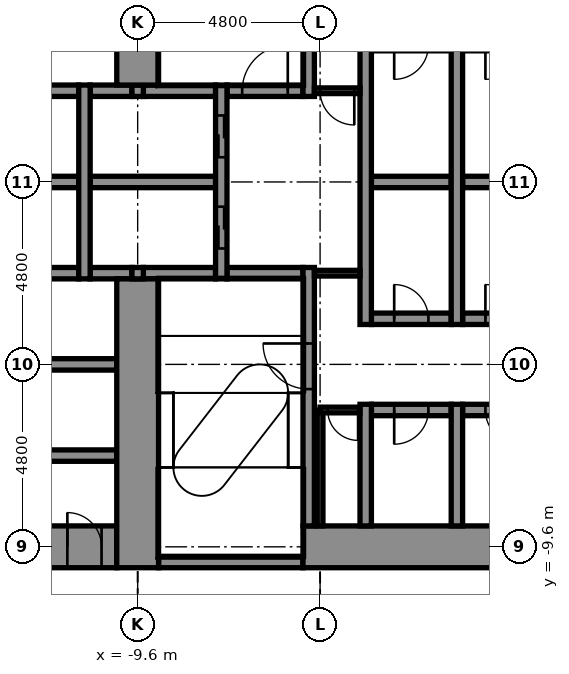
"""IFC4 building model, lengths in metres.
Left out: names, types, materials, properties, quantities, classifications, styles, units other than length and angle.
Written with IfcOpenShell. Run it as: python <this file> out.ifc"""

import sys

from ifc_helpers import new_model, si_unit, direction, frame, frame_2d, origin, place, context, subcontext, project, spatial, rectangle, extrude, element, fill, save


model = new_model("IFC4")
c1 = context("Model", 3, precision=1e-05, world=origin(), true_north=direction((0.0, 1.0)))
c2 = subcontext(c1, "Body", "Model", "MODEL_VIEW")
j1 = project(units=[si_unit("LENGTHUNIT", "METRE"), si_unit("PLANEANGLEUNIT", "RADIAN")], contexts=[c1])
p1 = place(None, origin())
s1 = spatial("IfcSite", under=j1, at=p1, CompositionType="ELEMENT")
p2 = place(p1, origin())
s2 = spatial("IfcBuilding", under=s1, at=p2, CompositionType="ELEMENT")
p3 = place(p2, frame((0.0, 0.0, 60.9)))
s3 = spatial("IfcBuildingStorey", under=s2, at=p3, CompositionType="ELEMENT", Elevation=60.9)
p4 = place(p3, frame((-9.05, -10.0, -0.25), z_axis=(0.0, 0.0, 1.0), x_axis=(1.0, 0.0, 0.0)))
e1 = element("IfcWall", 1, at=p4, inside=s3, PredefinedType="STANDARD", context=c2, shape_type="SweptSolid", body=[
    extrude(rectangle(XDim=3.8, YDim=0.3, at=frame_2d((1.9, 0.0))), origin(), (0.0, 0.0, 1.0), 5.45),
])
p5 = place(p3, frame((-13.85, -9.6, -0.25), z_axis=(0.0, 0.0, 1.0), x_axis=(1.0, 0.0, 0.0)))
e2 = element("IfcWall", 2, at=p5, inside=s3, PredefinedType="SHEAR", context=c2, shape_type="SweptSolid", body=[
    extrude(rectangle(XDim=3.7, YDim=1.1, at=frame_2d((1.85, 0.0))), origin(), (0.0, 0.0, 1.0), 5.45),
])
p6 = place(p5, frame((0.05, 0.0, 0.25)))
e3 = element("IfcOpeningElement", 3, at=p6, cuts=e2, PredefinedType="OPENING", context=c2, shape_type="SweptSolid", body=[
    extrude(rectangle(XDim=0.9, YDim=2.1, at=frame_2d((0.45, 1.05))), frame((0.0, 0.56, 0.0), z_axis=(0.0, -1.0, 0.0), x_axis=(1.0, 0.0, 0.0)), (0.0, 0.0, 1.0), 1.12),
])
p7 = place(p5, frame((2.4, 0.0, 0.25)))
e4 = element("IfcOpeningElement", 4, at=p7, cuts=e2, PredefinedType="OPENING", context=c2, shape_type="SweptSolid", body=[
    extrude(rectangle(XDim=0.9, YDim=2.1, at=frame_2d((0.45, 1.05))), frame((0.0, 0.56, 0.0), z_axis=(0.0, -1.0, 0.0), x_axis=(1.0, 0.0, 0.0)), (0.0, 0.0, 1.0), 1.12),
])
p8 = place(p3, frame((-5.25, -9.6, -0.25), z_axis=(0.0, 0.0, 1.0), x_axis=(1.0, 0.0, 0.0)))
e5 = element("IfcWall", 5, at=p8, inside=s3, PredefinedType="SHEAR", context=c2, shape_type="SweptSolid", body=[
    extrude(rectangle(XDim=10.2, YDim=1.1, at=frame_2d((5.1, 0.0))), origin(), (0.0, 0.0, 1.0), 5.45),
])
p9 = place(p8, frame((9.0, 0.0, 0.25)))
e6 = element("IfcOpeningElement", 6, at=p9, cuts=e5, PredefinedType="OPENING", context=c2, shape_type="SweptSolid", body=[
    extrude(rectangle(XDim=0.9, YDim=2.1, at=frame_2d((0.45, 1.05))), frame((0.0, 0.56, 0.0), z_axis=(0.0, -1.0, 0.0), x_axis=(1.0, 0.0, 0.0)), (0.0, 0.0, 1.0), 1.12),
])
p10 = place(p3, frame((-13.85, -7.2, -0.25), z_axis=(0.0, 0.0, 1.0), x_axis=(1.0, 0.0, 0.0)))
e7 = element("IfcWall", 7, at=p10, inside=s3, PredefinedType="STANDARD", context=c2, shape_type="SweptSolid", body=[
    extrude(rectangle(XDim=3.7, YDim=0.3, at=frame_2d((1.85, 0.0))), origin(), (0.0, 0.0, 1.0), 5.45),
])
p11 = place(p3, frame((-3.45, -6.0, -0.25), z_axis=(0.0, 0.0, 1.0), x_axis=(1.0, 0.0, 0.0)))
e8 = element("IfcWall", 8, at=p11, inside=s3, PredefinedType="STANDARD", context=c2, shape_type="SweptSolid", body=[
    extrude(rectangle(XDim=2.1, YDim=0.3, at=frame_2d((1.05, 0.0))), origin(), (0.0, 0.0, 1.0), 5.45),
])
p12 = place(p11, frame((0.6, 0.0, 0.25)))
e9 = element("IfcOpeningElement", 9, at=p12, cuts=e8, PredefinedType="OPENING", context=c2, shape_type="SweptSolid", body=[
    extrude(rectangle(XDim=0.9, YDim=2.1, at=frame_2d((0.45, 1.05))), frame((0.0, 0.16, 0.0), z_axis=(0.0, -1.0, 0.0), x_axis=(1.0, 0.0, 0.0)), (0.0, 0.0, 1.0), 0.32),
])
p13 = place(p3, frame((-1.05, -6.0, -0.25), z_axis=(0.0, 0.0, 1.0), x_axis=(1.0, 0.0, 0.0)))
e10 = element("IfcWall", 10, at=p13, inside=s3, PredefinedType="STANDARD", context=c2, shape_type="SweptSolid", body=[
    extrude(rectangle(XDim=2.1, YDim=0.3, at=frame_2d((1.05, 0.0))), origin(), (0.0, 0.0, 1.0), 5.45),
])
p14 = place(p13, frame((0.6, 0.0, 0.25)))
e11 = element("IfcOpeningElement", 11, at=p14, cuts=e10, PredefinedType="OPENING", context=c2, shape_type="SweptSolid", body=[
    extrude(rectangle(XDim=0.9, YDim=2.1, at=frame_2d((0.45, 1.05))), frame((0.0, 0.16, 0.0), z_axis=(0.0, -1.0, 0.0), x_axis=(1.0, 0.0, 0.0)), (0.0, 0.0, 1.0), 0.32),
])
p15 = place(p3, frame((-13.85, -4.8, -0.25), z_axis=(0.0, 0.0, 1.0), x_axis=(1.0, 0.0, 0.0)))
e12 = element("IfcWall", 12, at=p15, inside=s3, PredefinedType="STANDARD", context=c2, shape_type="SweptSolid", body=[
    extrude(rectangle(XDim=3.7, YDim=0.3, at=frame_2d((1.85, 0.0))), origin(), (0.0, 0.0, 1.0), 5.45),
])
p16 = place(p3, frame((-3.45, -3.6, -0.25), z_axis=(0.0, 0.0, 1.0), x_axis=(1.0, 0.0, 0.0)))
e13 = element("IfcWall", 13, at=p16, inside=s3, PredefinedType="STANDARD", context=c2, shape_type="SweptSolid", body=[
    extrude(rectangle(XDim=2.1, YDim=0.3, at=frame_2d((1.05, 0.0))), origin(), (0.0, 0.0, 1.0), 5.45),
])
p17 = place(p16, frame((0.6, 0.0, 0.25)))
e14 = element("IfcOpeningElement", 14, at=p17, cuts=e13, PredefinedType="OPENING", context=c2, shape_type="SweptSolid", body=[
    extrude(rectangle(XDim=0.9, YDim=2.1, at=frame_2d((0.45, 1.05))), frame((0.0, 0.16, 0.0), z_axis=(0.0, -1.0, 0.0), x_axis=(1.0, 0.0, 0.0)), (0.0, 0.0, 1.0), 0.32),
])
p18 = place(p3, frame((-1.05, -3.6, -0.25), z_axis=(0.0, 0.0, 1.0), x_axis=(1.0, 0.0, 0.0)))
e15 = element("IfcWall", 15, at=p18, inside=s3, PredefinedType="STANDARD", context=c2, shape_type="SweptSolid", body=[
    extrude(rectangle(XDim=2.1, YDim=0.3, at=frame_2d((1.05, 0.0))), origin(), (0.0, 0.0, 1.0), 5.45),
])
p19 = place(p18, frame((0.6, 0.0, 0.25)))
e16 = element("IfcOpeningElement", 16, at=p19, cuts=e15, PredefinedType="OPENING", context=c2, shape_type="SweptSolid", body=[
    extrude(rectangle(XDim=0.9, YDim=2.1, at=frame_2d((0.45, 1.05))), frame((0.0, 0.16, 0.0), z_axis=(0.0, -1.0, 0.0), x_axis=(1.0, 0.0, 0.0)), (0.0, 0.0, 1.0), 0.32),
])
p20 = place(p3, frame((-13.85, -2.4, -0.25), z_axis=(0.0, 0.0, 1.0), x_axis=(1.0, 0.0, 0.0)))
e17 = element("IfcWall", 17, at=p20, inside=s3, PredefinedType="STANDARD", context=c2, shape_type="SweptSolid", body=[
    extrude(rectangle(XDim=2.7, YDim=0.3, at=frame_2d((1.35, 0.0))), origin(), (0.0, 0.0, 1.0), 5.45),
])
p21 = place(p3, frame((-10.85, -2.4, -0.25), z_axis=(0.0, 0.0, 1.0), x_axis=(1.0, 0.0, 0.0)))
e18 = element("IfcWall", 18, at=p21, inside=s3, PredefinedType="STANDARD", context=c2, shape_type="SweptSolid", body=[
    extrude(rectangle(XDim=1.1, YDim=0.3, at=frame_2d((0.55, 0.0))), origin(), (0.0, 0.0, 1.0), 5.45),
])
p22 = place(p3, frame((-9.45, -2.4, -0.25), z_axis=(0.0, 0.0, 1.0), x_axis=(1.0, 0.0, 0.0)))
e19 = element("IfcWall", 19, at=p22, inside=s3, PredefinedType="STANDARD", context=c2, shape_type="SweptSolid", body=[
    extrude(rectangle(XDim=1.9, YDim=0.3, at=frame_2d((0.95, 0.0))), origin(), (0.0, 0.0, 1.0), 5.45),
])
p23 = place(p3, frame((-7.25, -2.4, -0.25), z_axis=(0.0, 0.0, 1.0), x_axis=(1.0, 0.0, 0.0)))
e20 = element("IfcWall", 20, at=p23, inside=s3, PredefinedType="STANDARD", context=c2, shape_type="SweptSolid", body=[
    extrude(rectangle(XDim=2.0, YDim=0.3, at=frame_2d((1.0, 0.0))), origin(), (0.0, 0.0, 1.0), 5.45),
])
p24 = place(p3, frame((-13.85, 0.0, -0.25), z_axis=(0.0, 0.0, 1.0), x_axis=(1.0, 0.0, 0.0)))
e21 = element("IfcWall", 21, at=p24, inside=s3, PredefinedType="STANDARD", context=c2, shape_type="SweptSolid", body=[
    extrude(rectangle(XDim=2.7, YDim=0.3, at=frame_2d((1.35, 0.0))), origin(), (0.0, 0.0, 1.0), 5.45),
])
p25 = place(p3, frame((-10.85, 0.0, -0.25), z_axis=(0.0, 0.0, 1.0), x_axis=(1.0, 0.0, 0.0)))
e22 = element("IfcWall", 22, at=p25, inside=s3, PredefinedType="STANDARD", context=c2, shape_type="SweptSolid", body=[
    extrude(rectangle(XDim=3.3, YDim=0.3, at=frame_2d((1.65, 0.0))), origin(), (0.0, 0.0, 1.0), 5.45),
])
p26 = place(p3, frame((-3.45, 0.0, -0.25), z_axis=(0.0, 0.0, 1.0), x_axis=(1.0, 0.0, 0.0)))
e23 = element("IfcWall", 23, at=p26, inside=s3, PredefinedType="STANDARD", context=c2, shape_type="SweptSolid", body=[
    extrude(rectangle(XDim=2.1, YDim=0.3, at=frame_2d((1.05, 0.0))), origin(), (0.0, 0.0, 1.0), 5.45),
])
p27 = place(p3, frame((-1.05, 0.0, -0.25), z_axis=(0.0, 0.0, 1.0), x_axis=(1.0, 0.0, 0.0)))
e24 = element("IfcWall", 24, at=p27, inside=s3, PredefinedType="STANDARD", context=c2, shape_type="SweptSolid", body=[
    extrude(rectangle(XDim=2.1, YDim=0.3, at=frame_2d((1.05, 0.0))), origin(), (0.0, 0.0, 1.0), 5.45),
])
p28 = place(p3, frame((-13.85, 2.4, -0.25), z_axis=(0.0, 0.0, 1.0), x_axis=(1.0, 0.0, 0.0)))
e25 = element("IfcWall", 25, at=p28, inside=s3, PredefinedType="STANDARD", context=c2, shape_type="SweptSolid", body=[
    extrude(rectangle(XDim=2.7, YDim=0.3, at=frame_2d((1.35, 0.0))), origin(), (0.0, 0.0, 1.0), 5.45),
])
p29 = place(p3, frame((-10.85, 2.4, -0.25), z_axis=(0.0, 0.0, 1.0), x_axis=(1.0, 0.0, 0.0)))
e26 = element("IfcWall", 26, at=p29, inside=s3, PredefinedType="STANDARD", context=c2, shape_type="SweptSolid", body=[
    extrude(rectangle(XDim=1.1, YDim=0.3, at=frame_2d((0.55, 0.0))), origin(), (0.0, 0.0, 1.0), 5.45),
])
p30 = place(p3, frame((-9.45, 2.4, -0.25), z_axis=(0.0, 0.0, 1.0), x_axis=(1.0, 0.0, 0.0)))
e27 = element("IfcWall", 27, at=p30, inside=s3, PredefinedType="STANDARD", context=c2, shape_type="SweptSolid", body=[
    extrude(rectangle(XDim=1.9, YDim=0.3, at=frame_2d((0.95, 0.0))), origin(), (0.0, 0.0, 1.0), 5.45),
])
p31 = place(p3, frame((-7.25, 2.4, -0.25), z_axis=(0.0, 0.0, 1.0), x_axis=(1.0, 0.0, 0.0)))
e28 = element("IfcWall", 28, at=p31, inside=s3, PredefinedType="STANDARD", context=c2, shape_type="SweptSolid", body=[
    extrude(rectangle(XDim=2.0, YDim=0.3, at=frame_2d((1.0, 0.0))), origin(), (0.0, 0.0, 1.0), 5.45),
])
p32 = place(p31, frame((0.4, 0.0, 0.25)))
e29 = element("IfcOpeningElement", 29, at=p32, cuts=e28, PredefinedType="OPENING", context=c2, shape_type="SweptSolid", body=[
    extrude(rectangle(XDim=1.2, YDim=2.1, at=frame_2d((0.6, 1.05))), frame((0.0, 0.16, 0.0), z_axis=(0.0, -1.0, 0.0), x_axis=(1.0, 0.0, 0.0)), (0.0, 0.0, 1.0), 0.32),
])
p33 = place(p3, frame((-11.0, -2.55, -0.25), z_axis=(0.0, 0.0, 1.0), x_axis=(0.0, 1.0, 0.0)))
e30 = element("IfcWall", 30, at=p33, inside=s3, PredefinedType="STANDARD", context=c2, shape_type="SweptSolid", body=[
    extrude(rectangle(XDim=5.1, YDim=0.3, at=frame_2d((2.55, 0.0))), origin(), (0.0, 0.0, 1.0), 5.45),
])
p34 = place(p3, frame((-9.6, -10.15, -0.25), z_axis=(0.0, 0.0, 1.0), x_axis=(0.0, 1.0, 0.0)))
e31 = element("IfcWall", 31, at=p34, inside=s3, PredefinedType="SHEAR", context=c2, shape_type="SweptSolid", body=[
    extrude(rectangle(XDim=7.6, YDim=1.1, at=frame_2d((3.8, 0.0))), origin(), (0.0, 0.0, 1.0), 5.45),
])
for number, where, z_axis, x_axis in (
    (32, (-9.6, -2.55, -0.25), (0.0, 0.0, 1.0), (0.0, 1.0, 0.0)),
    (33, (-9.6, 2.25, -0.25), (0.0, 0.0, 1.0), (0.0, 1.0, 0.0)),
):
    element("IfcWall", number, at=place(p3, frame(where, z_axis=z_axis, x_axis=x_axis)), inside=s3, PredefinedType="STANDARD", context=c2, shape_type="SweptSolid", body=[
        extrude(rectangle(XDim=0.3, YDim=0.3, at=frame_2d((0.15, 0.0))), origin(), (0.0, 0.0, 1.0), 5.45),
    ])
p35 = place(p3, frame((-9.6, 2.55, -0.25), z_axis=(0.0, 0.0, 1.0), x_axis=(0.0, 1.0, 0.0)))
e34 = element("IfcWall", 34, at=p35, inside=s3, PredefinedType="SHEAR", context=c2, shape_type="SweptSolid", body=[
    extrude(rectangle(XDim=7.6, YDim=1.1, at=frame_2d((3.8, 0.0))), origin(), (0.0, 0.0, 1.0), 5.45),
])
p36 = place(p3, frame((-7.4, -2.55, -0.25), z_axis=(0.0, 0.0, 1.0), x_axis=(0.0, 1.0, 0.0)))
e35 = element("IfcWall", 35, at=p36, inside=s3, PredefinedType="STANDARD", context=c2, shape_type="SweptSolid", body=[
    extrude(rectangle(XDim=5.1, YDim=0.3, at=frame_2d((2.55, 0.0))), origin(), (0.0, 0.0, 1.0), 5.45),
])
p37 = place(p36, frame((0.8, 0.0, 0.25)))
e36 = element("IfcOpeningElement", 36, at=p37, cuts=e35, PredefinedType="OPENING", context=c2, shape_type="SweptSolid", body=[
    extrude(rectangle(XDim=1.1, YDim=2.1, at=frame_2d((0.55, 1.05))), frame((0.0, 0.16, 0.0), z_axis=(0.0, -1.0, 0.0), x_axis=(1.0, 0.0, 0.0)), (0.0, 0.0, 1.0), 0.32),
])
p38 = place(p36, frame((3.2, 0.0, 0.25)))
e37 = element("IfcOpeningElement", 37, at=p38, cuts=e35, PredefinedType="OPENING", context=c2, shape_type="SweptSolid", body=[
    extrude(rectangle(XDim=1.1, YDim=2.1, at=frame_2d((0.55, 1.05))), frame((0.0, 0.16, 0.0), z_axis=(0.0, -1.0, 0.0), x_axis=(1.0, 0.0, 0.0)), (0.0, 0.0, 1.0), 0.32),
])
p39 = place(p3, frame((-5.1, -9.05, -0.25), z_axis=(0.0, 0.0, 1.0), x_axis=(0.0, 1.0, 0.0)))
e38 = element("IfcWall", 38, at=p39, inside=s3, PredefinedType="STANDARD", context=c2, shape_type="SweptSolid", body=[
    extrude(rectangle(XDim=6.8, YDim=0.3, at=frame_2d((3.4, 0.0))), origin(), (0.0, 0.0, 1.0), 5.45),
])
p40 = place(p39, frame((3.6, 0.0, 0.25)))
e39 = element("IfcOpeningElement", 39, at=p40, cuts=e38, PredefinedType="OPENING", context=c2, shape_type="SweptSolid", body=[
    extrude(rectangle(XDim=1.2, YDim=2.1, at=frame_2d((0.6, 1.05))), frame((0.0, 0.16, 0.0), z_axis=(0.0, -1.0, 0.0), x_axis=(1.0, 0.0, 0.0)), (0.0, 0.0, 1.0), 0.32),
])
p41 = place(p3, frame((-5.1, 2.25, -0.25), z_axis=(0.0, 0.0, 1.0), x_axis=(0.0, 1.0, 0.0)))
e40 = element("IfcWall", 40, at=p41, inside=s3, PredefinedType="STANDARD", context=c2, shape_type="SweptSolid", body=[
    extrude(rectangle(XDim=6.8, YDim=0.3, at=frame_2d((3.4, 0.0))), origin(), (0.0, 0.0, 1.0), 5.45),
])
p42 = place(p41, frame((2.0, 0.0, 0.25)))
e41 = element("IfcOpeningElement", 41, at=p42, cuts=e40, PredefinedType="OPENING", context=c2, shape_type="SweptSolid", body=[
    extrude(rectangle(XDim=1.2, YDim=2.1, at=frame_2d((0.6, 1.05))), frame((0.0, 0.16, 0.0), z_axis=(0.0, -1.0, 0.0), x_axis=(1.0, 0.0, 0.0)), (0.0, 0.0, 1.0), 0.32),
])
p43 = place(p3, frame((-3.6, -9.05, -0.25), z_axis=(0.0, 0.0, 1.0), x_axis=(0.0, 1.0, 0.0)))
e42 = element("IfcWall", 42, at=p43, inside=s3, PredefinedType="STANDARD", context=c2, shape_type="SweptSolid", body=[
    extrude(rectangle(XDim=3.2, YDim=0.3, at=frame_2d((1.6, 0.0))), origin(), (0.0, 0.0, 1.0), 5.45),
])
p44 = place(p3, frame((-3.6, -3.75, -0.25), z_axis=(0.0, 0.0, 1.0), x_axis=(0.0, 1.0, 0.0)))
e43 = element("IfcWall", 43, at=p44, inside=s3, PredefinedType="STANDARD", context=c2, shape_type="SweptSolid", body=[
    extrude(rectangle(XDim=7.5, YDim=0.3, at=frame_2d((3.75, 0.0))), origin(), (0.0, 0.0, 1.0), 5.45),
])
p45 = place(p3, frame((-1.2, -9.05, -0.25), z_axis=(0.0, 0.0, 1.0), x_axis=(0.0, 1.0, 0.0)))
e44 = element("IfcWall", 44, at=p45, inside=s3, PredefinedType="STANDARD", context=c2, shape_type="SweptSolid", body=[
    extrude(rectangle(XDim=3.2, YDim=0.3, at=frame_2d((1.6, 0.0))), origin(), (0.0, 0.0, 1.0), 5.45),
])
p46 = place(p3, frame((-1.2, -3.75, -0.25), z_axis=(0.0, 0.0, 1.0), x_axis=(0.0, 1.0, 0.0)))
e45 = element("IfcWall", 45, at=p46, inside=s3, PredefinedType="STANDARD", context=c2, shape_type="SweptSolid", body=[
    extrude(rectangle(XDim=7.5, YDim=0.3, at=frame_2d((3.75, 0.0))), origin(), (0.0, 0.0, 1.0), 5.45),
])
p47 = place(p3, frame((-4.8, -9.05, 0.0), z_axis=(0.0, 0.0, 1.0), x_axis=(0.0, 1.0, 0.0)))
e46 = element("IfcWall", 46, at=p47, inside=s3, PredefinedType="PARTITIONING", context=c2, shape_type="SweptSolid", body=[
    extrude(rectangle(XDim=3.05, YDim=0.15, at=frame_2d((1.525, 0.0))), origin(), (0.0, 0.0, 1.0), 5.2),
])
p48 = place(p3, frame((-4.8, -6.0, 0.0), z_axis=(0.0, 0.0, 1.0), x_axis=(1.0, 0.0, 0.0)))
e47 = element("IfcWall", 47, at=p48, inside=s3, PredefinedType="PARTITIONING", context=c2, shape_type="SweptSolid", body=[
    extrude(rectangle(XDim=1.05, YDim=0.15, at=frame_2d((0.525, 0.0))), origin(), (0.0, 0.0, 1.0), 5.2),
])
p49 = place(p48, frame((0.2, 0.0, 0.0)))
e48 = element("IfcOpeningElement", 48, at=p49, cuts=e47, PredefinedType="OPENING", context=c2, shape_type="SweptSolid", body=[
    extrude(rectangle(XDim=0.8, YDim=2.1, at=frame_2d((0.4, 1.05))), frame((0.0, 0.085, 0.0), z_axis=(0.0, -1.0, 0.0), x_axis=(1.0, 0.0, 0.0)), (0.0, 0.0, 1.0), 0.17),
])
p50 = place(p3, frame((-4.95, 2.4, 0.0), z_axis=(0.0, 0.0, 1.0), x_axis=(1.0, 0.0, 0.0)))
e49 = element("IfcWall", 49, at=p50, inside=s3, PredefinedType="PARTITIONING", context=c2, shape_type="SweptSolid", body=[
    extrude(rectangle(XDim=1.2, YDim=0.15, at=frame_2d((0.6, 0.0))), origin(), (0.0, 0.0, 1.0), 5.2),
])
p51 = place(p50, frame((0.15, 0.0, 0.0)))
e50 = element("IfcOpeningElement", 50, at=p51, cuts=e49, PredefinedType="OPENING", context=c2, shape_type="SweptSolid", body=[
    extrude(rectangle(XDim=0.9, YDim=2.1, at=frame_2d((0.45, 1.05))), frame((0.0, 0.085, 0.0), z_axis=(0.0, -1.0, 0.0), x_axis=(1.0, 0.0, 0.0)), (0.0, 0.0, 1.0), 0.17),
])
p52 = place(p3, frame((-4.95, -2.4, 0.0), z_axis=(0.0, 0.0, 1.0), x_axis=(1.0, 0.0, 0.0)))
e51 = element("IfcWall", 51, at=p52, inside=s3, PredefinedType="PARTITIONING", context=c2, shape_type="SweptSolid", body=[
    extrude(rectangle(XDim=1.2, YDim=0.15, at=frame_2d((0.6, 0.0))), origin(), (0.0, 0.0, 1.0), 5.2),
])
p53 = place(p49, frame((0.8, 0.0, 0.0), z_axis=(0.0, 0.0, 1.0), x_axis=(-1.0, 0.0, 0.0)))
e52 = element("IfcDoor", 52, at=p53, inside=s3, OperationType="SINGLE_SWING_RIGHT", PredefinedType="DOOR", context=c2, shape_type="SweptSolid", body=[
    extrude(rectangle(XDim=0.8, YDim=2.1, at=frame_2d((0.4, 1.05))), frame((0.0, 0.025, 0.0), z_axis=(0.0, -1.0, 0.0), x_axis=(1.0, 0.0, 0.0)), (0.0, 0.0, 1.0), 0.05),
])
fill(e48, e52)
p54 = place(p37, origin())
e53 = element("IfcDoor", 53, at=p54, inside=s3, OperationType="DOUBLE_DOOR_SLIDING", PredefinedType="DOOR", context=c2, shape_type="SweptSolid", body=[
    extrude(rectangle(XDim=1.1, YDim=2.1, at=frame_2d((0.55, 1.05))), frame((0.0, 0.025, 0.0), z_axis=(0.0, -1.0, 0.0), x_axis=(1.0, 0.0, 0.0)), (0.0, 0.0, 1.0), 0.05),
])
fill(e36, e53)
p55 = place(p38, origin())
e54 = element("IfcDoor", 54, at=p55, inside=s3, OperationType="DOUBLE_DOOR_SLIDING", PredefinedType="DOOR", context=c2, shape_type="SweptSolid", body=[
    extrude(rectangle(XDim=1.1, YDim=2.1, at=frame_2d((0.55, 1.05))), frame((0.0, 0.025, 0.0), z_axis=(0.0, -1.0, 0.0), x_axis=(1.0, 0.0, 0.0)), (0.0, 0.0, 1.0), 0.05),
])
fill(e37, e54)
p56 = place(p40, origin())
e55 = element("IfcDoor", 55, at=p56, inside=s3, OperationType="SINGLE_SWING_RIGHT", PredefinedType="DOOR", context=c2, shape_type="SweptSolid", body=[
    extrude(rectangle(XDim=1.2, YDim=2.1, at=frame_2d((0.6, 1.05))), frame((0.0, 0.025, 0.0), z_axis=(0.0, -1.0, 0.0), x_axis=(1.0, 0.0, 0.0)), (0.0, 0.0, 1.0), 0.05),
])
fill(e39, e55)
p57 = place(p17, origin())
e56 = element("IfcDoor", 56, at=p57, inside=s3, OperationType="SINGLE_SWING_LEFT", PredefinedType="DOOR", context=c2, shape_type="SweptSolid", body=[
    extrude(rectangle(XDim=0.9, YDim=2.1, at=frame_2d((0.45, 1.05))), frame((0.0, 0.025, 0.0), z_axis=(0.0, -1.0, 0.0), x_axis=(1.0, 0.0, 0.0)), (0.0, 0.0, 1.0), 0.05),
])
fill(e14, e56)
p58 = place(p19, origin())
e57 = element("IfcDoor", 57, at=p58, inside=s3, OperationType="SINGLE_SWING_LEFT", PredefinedType="DOOR", context=c2, shape_type="SweptSolid", body=[
    extrude(rectangle(XDim=0.9, YDim=2.1, at=frame_2d((0.45, 1.05))), frame((0.0, 0.025, 0.0), z_axis=(0.0, -1.0, 0.0), x_axis=(1.0, 0.0, 0.0)), (0.0, 0.0, 1.0), 0.05),
])
fill(e16, e57)
p59 = place(p12, frame((0.9, 0.0, 0.0), z_axis=(0.0, 0.0, 1.0), x_axis=(-1.0, 0.0, 0.0)))
e58 = element("IfcDoor", 58, at=p59, inside=s3, OperationType="SINGLE_SWING_LEFT", PredefinedType="DOOR", context=c2, shape_type="SweptSolid", body=[
    extrude(rectangle(XDim=0.9, YDim=2.1, at=frame_2d((0.45, 1.05))), frame((0.0, 0.025, 0.0), z_axis=(0.0, -1.0, 0.0), x_axis=(1.0, 0.0, 0.0)), (0.0, 0.0, 1.0), 0.05),
])
fill(e9, e58)
p60 = place(p14, frame((0.9, 0.0, 0.0), z_axis=(0.0, 0.0, 1.0), x_axis=(-1.0, 0.0, 0.0)))
e59 = element("IfcDoor", 59, at=p60, inside=s3, OperationType="SINGLE_SWING_RIGHT", PredefinedType="DOOR", context=c2, shape_type="SweptSolid", body=[
    extrude(rectangle(XDim=0.9, YDim=2.1, at=frame_2d((0.45, 1.05))), frame((0.0, 0.025, 0.0), z_axis=(0.0, -1.0, 0.0), x_axis=(1.0, 0.0, 0.0)), (0.0, 0.0, 1.0), 0.05),
])
fill(e11, e59)
p61 = place(p7, origin())
e60 = element("IfcDoor", 60, at=p61, inside=s3, OperationType="SINGLE_SWING_LEFT", PredefinedType="DOOR", context=c2, shape_type="SweptSolid", body=[
    extrude(rectangle(XDim=0.9, YDim=2.1, at=frame_2d((0.45, 1.05))), frame((0.0, 0.025, 0.0), z_axis=(0.0, -1.0, 0.0), x_axis=(1.0, 0.0, 0.0)), (0.0, 0.0, 1.0), 0.05),
])
fill(e4, e60)
p62 = place(p51, frame((0.9, 0.0, 0.0), z_axis=(0.0, 0.0, 1.0), x_axis=(-1.0, 0.0, 0.0)))
e61 = element("IfcDoor", 61, at=p62, inside=s3, OperationType="SINGLE_SWING_RIGHT", PredefinedType="DOOR", context=c2, shape_type="SweptSolid", body=[
    extrude(rectangle(XDim=0.9, YDim=2.1, at=frame_2d((0.45, 1.05))), frame((0.0, 0.025, 0.0), z_axis=(0.0, -1.0, 0.0), x_axis=(1.0, 0.0, 0.0)), (0.0, 0.0, 1.0), 0.05),
])
fill(e50, e61)
p63 = place(p32, origin())
e62 = element("IfcDoor", 62, at=p63, inside=s3, OperationType="SINGLE_SWING_RIGHT", PredefinedType="DOOR", context=c2, shape_type="SweptSolid", body=[
    extrude(rectangle(XDim=1.2, YDim=2.1, at=frame_2d((0.6, 1.05))), frame((0.0, 0.025, 0.0), z_axis=(0.0, -1.0, 0.0), x_axis=(1.0, 0.0, 0.0)), (0.0, 0.0, 1.0), 0.05),
])
fill(e29, e62)
save(model, sys.argv[1])
